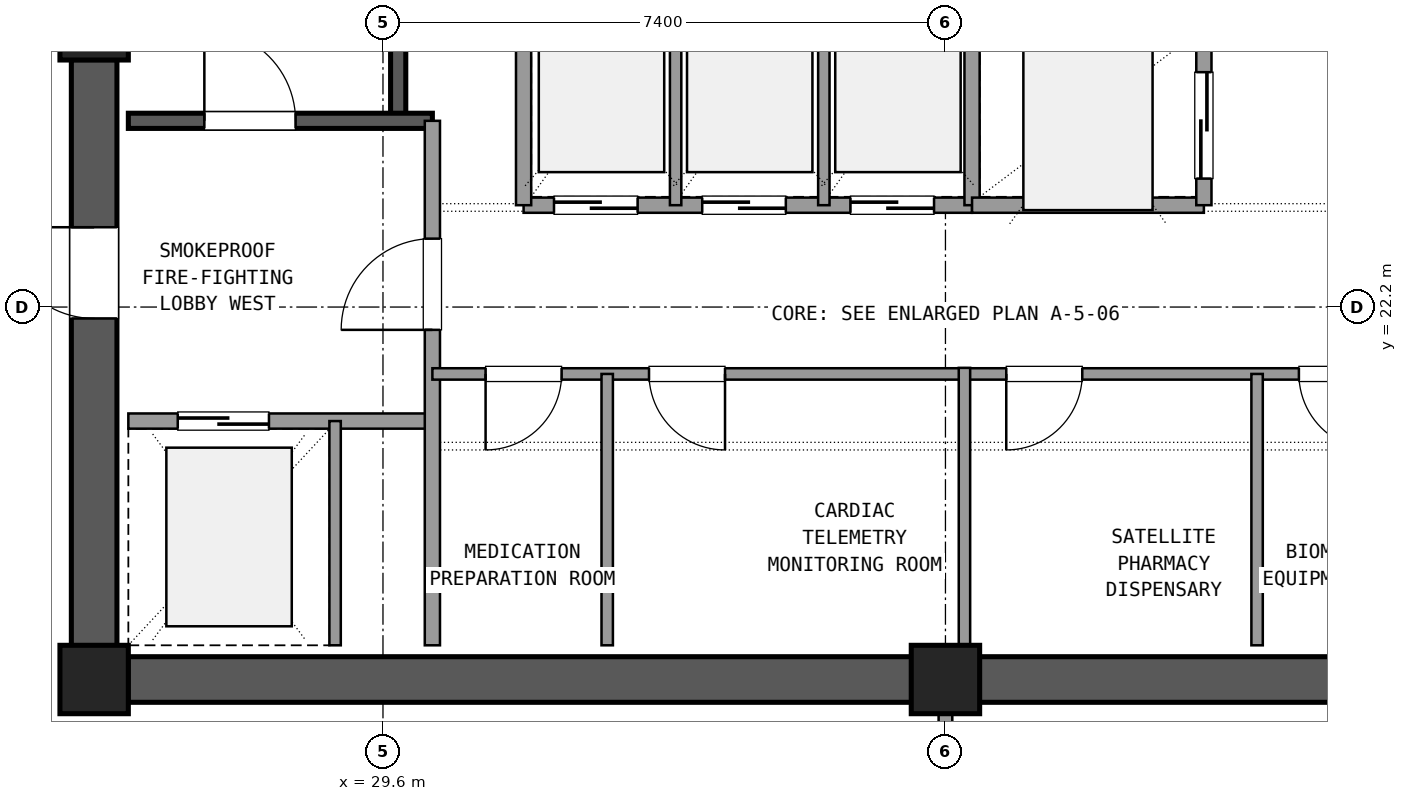
"""IFC4 building model, lengths in metres.
Left out: names, types, materials, properties, quantities, classifications, styles, units other than length and angle.
Written with IfcOpenShell. Run it as: python <this file> out.ifc"""

import sys

from ifc_helpers import new_model, si_unit, direction, frame, frame_2d, origin, origin_2d, place, context, subcontext, project, spatial, rectangle, extrude, element, fill, save


model = new_model("IFC4")
c1 = context("Model", 3, precision=1e-05, world=origin(), true_north=direction((0.0, 1.0)))
c2 = subcontext(c1, "Body", "Model", "MODEL_VIEW")
j1 = project(units=[si_unit("LENGTHUNIT", "METRE"), si_unit("PLANEANGLEUNIT", "RADIAN")], contexts=[c1])
p1 = place(None, origin())
s1 = spatial("IfcSite", under=j1, at=p1, CompositionType="ELEMENT")
p2 = place(p1, origin())
s2 = spatial("IfcBuilding", under=s1, at=p2, CompositionType="ELEMENT")
p3 = place(p2, frame((0.0, 0.0, 250.02)))
s3 = spatial("IfcBuildingStorey", under=s2, at=p3, CompositionType="ELEMENT", Elevation=250.02)
for number, where, z_axis, x_axis in (
    (1, (25.8, 17.3, 0.0), (0.0, 0.0, 1.0), (1.0, 0.0, 0.0)),
    (2, (37.0, 17.3, 0.0), (0.0, 0.0, 1.0), (1.0, 0.0, 0.0)),
    (3, (25.8, 25.9, 0.0), (0.0, 0.0, 1.0), (1.0, 0.0, 0.0)),
):
    element("IfcColumn", number, at=place(p3, frame(where, z_axis=z_axis, x_axis=x_axis)), inside=s3, PredefinedType="COLUMN", context=c2, shape_type="SweptSolid", body=[
        extrude(rectangle(XDim=0.9, YDim=0.9, at=origin_2d()), origin(), (0.0, 0.0, 1.0), 3.6),
    ])
for number, where, z_axis, x_axis in (
    (4, (26.245, 17.3, 0.0), (0.0, 0.0, 1.0), (1.0, 0.0, 0.0)),
    (5, (37.445, 17.3, 0.0), (0.0, 0.0, 1.0), (1.0, 0.0, 0.0)),
):
    element("IfcWall", number, at=place(p3, frame(where, z_axis=z_axis, x_axis=x_axis)), inside=s3, PredefinedType="SHEAR", context=c2, shape_type="SweptSolid", body=[
        extrude(rectangle(XDim=10.31, YDim=0.6, at=frame_2d((5.155, 0.0))), origin(), (0.0, 0.0, 1.0), 3.32),
    ])
p4 = place(p3, frame((25.8, 25.455, 0.0), z_axis=(0.0, 0.0, 1.0), x_axis=(0.0, -1.0, 0.0)))
e6 = element("IfcWall", 6, at=p4, inside=s3, PredefinedType="SHEAR", context=c2, shape_type="SweptSolid", body=[
    extrude(rectangle(XDim=7.71, YDim=0.6, at=frame_2d((3.855, 0.0))), origin(), (0.0, 0.0, 1.0), 3.32),
])
p5 = place(p4, frame((2.205, 0.0, 0.0)))
e7 = element("IfcOpeningElement", 7, at=p5, cuts=e6, PredefinedType="OPENING", context=c2, shape_type="SweptSolid", body=[
    extrude(rectangle(XDim=1.2, YDim=2.15, at=frame_2d((0.6, 1.075))), frame((0.0, 0.31, 0.0), z_axis=(0.0, -1.0, 0.0), x_axis=(1.0, 0.0, 0.0)), (0.0, 0.0, 1.0), 0.62),
])
p6 = place(p3, frame((29.8, 24.65, 0.0), z_axis=(0.0, 0.0, 1.0), x_axis=(0.0, 1.0, 0.0)))
e8 = element("IfcWall", 8, at=p6, inside=s3, PredefinedType="SHEAR", context=c2, shape_type="SweptSolid", body=[
    extrude(rectangle(XDim=9.4, YDim=0.2, at=frame_2d((4.7, 0.0))), origin(), (0.0, 0.0, 1.0), 3.32),
])
p7 = place(p3, frame((26.25, 24.65, 0.0), z_axis=(0.0, 0.0, 1.0), x_axis=(1.0, 0.0, 0.0)))
e9 = element("IfcWall", 9, at=p7, inside=s3, PredefinedType="SHEAR", context=c2, shape_type="SweptSolid", body=[
    extrude(rectangle(XDim=4.0, YDim=0.2, at=frame_2d((2.0, 0.0))), origin(), (0.0, 0.0, 1.0), 3.32),
])
p8 = place(p7, frame((1.0, 0.0, 0.0)))
e10 = element("IfcOpeningElement", 10, at=p8, cuts=e9, PredefinedType="OPENING", context=c2, shape_type="SweptSolid", body=[
    extrude(rectangle(XDim=1.2, YDim=2.15, at=frame_2d((0.6, 1.075))), frame((0.0, 0.11, 0.0), z_axis=(0.0, -1.0, 0.0), x_axis=(1.0, 0.0, 0.0)), (0.0, 0.0, 1.0), 0.22),
])
p9 = place(p3, frame((26.25, 20.7, 0.0), z_axis=(0.0, 0.0, 1.0), x_axis=(1.0, 0.0, 0.0)))
e11 = element("IfcWall", 11, at=p9, inside=s3, PredefinedType="SOLIDWALL", context=c2, shape_type="SweptSolid", body=[
    extrude(rectangle(XDim=4.0, YDim=0.2, at=frame_2d((2.0, 0.0))), origin(), (0.0, 0.0, 1.0), 2.61),
])
p10 = place(p9, frame((0.65, 0.0, 0.0)))
e12 = element("IfcOpeningElement", 12, at=p10, cuts=e11, PredefinedType="OPENING", context=c2, shape_type="SweptSolid", body=[
    extrude(rectangle(XDim=1.2, YDim=2.15, at=frame_2d((0.6, 1.075))), frame((0.0, 0.11, 0.0), z_axis=(0.0, -1.0, 0.0), x_axis=(1.0, 0.0, 0.0)), (0.0, 0.0, 1.0), 0.22),
])
p11 = place(p3, frame((30.25, 17.75, 0.0), z_axis=(0.0, 0.0, 1.0), x_axis=(0.0, 1.0, 0.0)))
e13 = element("IfcWall", 13, at=p11, inside=s3, PredefinedType="SOLIDWALL", context=c2, shape_type="SweptSolid", body=[
    extrude(rectangle(XDim=6.9, YDim=0.2, at=frame_2d((3.45, 0.0))), origin(), (0.0, 0.0, 1.0), 2.61),
])
p12 = place(p11, frame((4.15, 0.0, 0.0)))
e14 = element("IfcOpeningElement", 14, at=p12, cuts=e13, PredefinedType="OPENING", context=c2, shape_type="SweptSolid", body=[
    extrude(rectangle(XDim=1.2, YDim=2.15, at=frame_2d((0.6, 1.075))), frame((0.0, 0.11, 0.0), z_axis=(0.0, -1.0, 0.0), x_axis=(1.0, 0.0, 0.0)), (0.0, 0.0, 1.0), 0.22),
])
p13 = place(p3, frame((28.97, 17.75, 0.0), z_axis=(0.0, 0.0, 1.0), x_axis=(0.0, 1.0, 0.0)))
e15 = element("IfcWall", 15, at=p13, inside=s3, PredefinedType="PARTITIONING", context=c2, shape_type="SweptSolid", body=[
    extrude(rectangle(XDim=2.95, YDim=0.15, at=frame_2d((1.475, 0.0))), origin(), (0.0, 0.0, 1.0), 2.61),
])
p14 = place(p3, frame((30.25, 21.32, 0.0), z_axis=(0.0, 0.0, 1.0), x_axis=(1.0, 0.0, 0.0)))
e16 = element("IfcWall", 16, at=p14, inside=s3, PredefinedType="PARTITIONING", context=c2, shape_type="SweptSolid", body=[
    extrude(rectangle(XDim=7.0, YDim=0.15, at=frame_2d((3.5, 0.0))), origin(), (0.0, 0.0, 1.0), 2.61),
])
p15 = place(p14, frame((0.7, 0.0, 0.0)))
e17 = element("IfcOpeningElement", 17, at=p15, cuts=e16, PredefinedType="OPENING", context=c2, shape_type="SweptSolid", body=[
    extrude(rectangle(XDim=1.0, YDim=2.15, at=frame_2d((0.5, 1.075))), frame((0.0, 0.085, 0.0), z_axis=(0.0, -1.0, 0.0), x_axis=(1.0, 0.0, 0.0)), (0.0, 0.0, 1.0), 0.17),
])
p16 = place(p14, frame((2.85, 0.0, 0.0)))
e18 = element("IfcOpeningElement", 18, at=p16, cuts=e16, PredefinedType="OPENING", context=c2, shape_type="SweptSolid", body=[
    extrude(rectangle(XDim=1.0, YDim=2.15, at=frame_2d((0.5, 1.075))), frame((0.0, 0.085, 0.0), z_axis=(0.0, -1.0, 0.0), x_axis=(1.0, 0.0, 0.0)), (0.0, 0.0, 1.0), 0.17),
])
p17 = place(p3, frame((32.55, 17.75, 0.0), z_axis=(0.0, 0.0, 1.0), x_axis=(0.0, 1.0, 0.0)))
e19 = element("IfcWall", 19, at=p17, inside=s3, PredefinedType="PARTITIONING", context=c2, shape_type="SweptSolid", body=[
    extrude(rectangle(XDim=3.57, YDim=0.15, at=frame_2d((1.785, 0.0))), origin(), (0.0, 0.0, 1.0), 2.61),
])
p18 = place(p3, frame((37.25, 21.32, 0.0), z_axis=(0.0, 0.0, 1.0), x_axis=(1.0, 0.0, 0.0)))
e20 = element("IfcWall", 20, at=p18, inside=s3, PredefinedType="PARTITIONING", context=c2, shape_type="SweptSolid", body=[
    extrude(rectangle(XDim=6.1, YDim=0.15, at=frame_2d((3.05, 0.0))), origin(), (0.0, 0.0, 1.0), 2.61),
])
p19 = place(p18, frame((0.55, 0.0, 0.0)))
e21 = element("IfcOpeningElement", 21, at=p19, cuts=e20, PredefinedType="OPENING", context=c2, shape_type="SweptSolid", body=[
    extrude(rectangle(XDim=1.0, YDim=2.15, at=frame_2d((0.5, 1.075))), frame((0.0, 0.085, 0.0), z_axis=(0.0, -1.0, 0.0), x_axis=(1.0, 0.0, 0.0)), (0.0, 0.0, 1.0), 0.17),
])
p20 = place(p18, frame((4.4, 0.0, 0.0)))
e22 = element("IfcOpeningElement", 22, at=p20, cuts=e20, PredefinedType="OPENING", context=c2, shape_type="SweptSolid", body=[
    extrude(rectangle(XDim=1.0, YDim=2.15, at=frame_2d((0.5, 1.075))), frame((0.0, 0.085, 0.0), z_axis=(0.0, -1.0, 0.0), x_axis=(1.0, 0.0, 0.0)), (0.0, 0.0, 1.0), 0.17),
])
p21 = place(p3, frame((41.1, 17.75, 0.0), z_axis=(0.0, 0.0, 1.0), x_axis=(0.0, 1.0, 0.0)))
e23 = element("IfcWall", 23, at=p21, inside=s3, PredefinedType="PARTITIONING", context=c2, shape_type="SweptSolid", body=[
    extrude(rectangle(XDim=3.57, YDim=0.15, at=frame_2d((1.785, 0.0))), origin(), (0.0, 0.0, 1.0), 2.61),
])
p22 = place(p3, frame((37.25, 17.75, 0.0), z_axis=(0.0, 0.0, 1.0), x_axis=(0.0, 1.0, 0.0)))
e24 = element("IfcWall", 24, at=p22, inside=s3, PredefinedType="PARTITIONING", context=c2, shape_type="SweptSolid", body=[
    extrude(rectangle(XDim=3.65, YDim=0.15, at=frame_2d((1.825, 0.0))), origin(), (0.0, 0.0, 1.0), 2.61),
])
p23 = place(p3, frame((31.45, 23.54, 0.0), z_axis=(0.0, 0.0, 1.0), x_axis=(1.0, 0.0, 0.0)))
e25 = element("IfcWall", 25, at=p23, inside=s3, PredefinedType="SOLIDWALL", context=c2, shape_type="SweptSolid", body=[
    extrude(rectangle(XDim=5.9, YDim=0.2, at=frame_2d((2.95, 0.0))), origin(), (0.0, 0.0, 1.0), 2.61),
])
p24 = place(p23, frame((0.4, 0.0, 0.0)))
e26 = element("IfcOpeningElement", 26, at=p24, cuts=e25, PredefinedType="OPENING", context=c2, shape_type="SweptSolid", body=[
    extrude(rectangle(XDim=1.1, YDim=2.15, at=frame_2d((0.55, 1.075))), frame((0.0, 0.11, 0.0), z_axis=(0.0, -1.0, 0.0), x_axis=(1.0, 0.0, 0.0)), (0.0, 0.0, 1.0), 0.22),
])
p25 = place(p23, frame((2.35, 0.0, 0.0)))
e27 = element("IfcOpeningElement", 27, at=p25, cuts=e25, PredefinedType="OPENING", context=c2, shape_type="SweptSolid", body=[
    extrude(rectangle(XDim=1.1, YDim=2.15, at=frame_2d((0.55, 1.075))), frame((0.0, 0.11, 0.0), z_axis=(0.0, -1.0, 0.0), x_axis=(1.0, 0.0, 0.0)), (0.0, 0.0, 1.0), 0.22),
])
p26 = place(p23, frame((4.3, 0.0, 0.0)))
e28 = element("IfcOpeningElement", 28, at=p26, cuts=e25, PredefinedType="OPENING", context=c2, shape_type="SweptSolid", body=[
    extrude(rectangle(XDim=1.1, YDim=2.15, at=frame_2d((0.55, 1.075))), frame((0.0, 0.11, 0.0), z_axis=(0.0, -1.0, 0.0), x_axis=(1.0, 0.0, 0.0)), (0.0, 0.0, 1.0), 0.22),
])
p27 = place(p3, frame((31.45, 23.54, 0.0), z_axis=(0.0, 0.0, 1.0), x_axis=(0.0, 1.0, 0.0)))
e29 = element("IfcWall", 29, at=p27, inside=s3, PredefinedType="SOLIDWALL", context=c2, shape_type="SweptSolid", body=[
    extrude(rectangle(XDim=2.81, YDim=0.2, at=frame_2d((1.405, 0.0))), origin(), (0.0, 0.0, 1.0), 2.61),
])
for number, where, z_axis, x_axis in (
    (30, (33.45, 23.54, 0.0), (0.0, 0.0, 1.0), (0.0, 1.0, 0.0)),
    (31, (35.4, 23.54, 0.0), (0.0, 0.0, 1.0), (0.0, 1.0, 0.0)),
):
    element("IfcWall", number, at=place(p3, frame(where, z_axis=z_axis, x_axis=x_axis)), inside=s3, PredefinedType="PARTITIONING", context=c2, shape_type="SweptSolid", body=[
        extrude(rectangle(XDim=2.81, YDim=0.15, at=frame_2d((1.405, 0.0))), origin(), (0.0, 0.0, 1.0), 2.61),
    ])
p28 = place(p3, frame((37.35, 23.54, 0.0), z_axis=(0.0, 0.0, 1.0), x_axis=(0.0, 1.0, 0.0)))
e32 = element("IfcWall", 32, at=p28, inside=s3, PredefinedType="SOLIDWALL", context=c2, shape_type="SweptSolid", body=[
    extrude(rectangle(XDim=6.82, YDim=0.2, at=frame_2d((3.41, 0.0))), origin(), (0.0, 0.0, 1.0), 2.61),
])
p29 = place(p3, frame((37.35, 23.54, 0.0), z_axis=(0.0, 0.0, 1.0), x_axis=(1.0, 0.0, 0.0)))
e33 = element("IfcWall", 33, at=p29, inside=s3, PredefinedType="SOLIDWALL", context=c2, shape_type="SweptSolid", body=[
    extrude(rectangle(XDim=3.05, YDim=0.2, at=frame_2d((1.525, 0.0))), origin(), (0.0, 0.0, 1.0), 2.61),
])
p30 = place(p3, frame((40.4, 23.54, 0.0), z_axis=(0.0, 0.0, 1.0), x_axis=(0.0, 1.0, 0.0)))
e34 = element("IfcWall", 34, at=p30, inside=s3, PredefinedType="SOLIDWALL", context=c2, shape_type="SweptSolid", body=[
    extrude(rectangle(XDim=6.82, YDim=0.2, at=frame_2d((3.41, 0.0))), origin(), (0.0, 0.0, 1.0), 2.61),
])
p31 = place(p30, frame((0.35, 0.0, 0.0)))
e35 = element("IfcOpeningElement", 35, at=p31, cuts=e34, PredefinedType="OPENING", context=c2, shape_type="SweptSolid", body=[
    extrude(rectangle(XDim=1.4, YDim=2.2, at=frame_2d((0.7, 1.1))), frame((0.0, 0.11, 0.0), z_axis=(0.0, -1.0, 0.0), x_axis=(1.0, 0.0, 0.0)), (0.0, 0.0, 1.0), 0.22),
])
p32 = place(p30, frame((2.65, 0.0, 0.0)))
e36 = element("IfcOpeningElement", 36, at=p32, cuts=e34, PredefinedType="OPENING", context=c2, shape_type="SweptSolid", body=[
    extrude(rectangle(XDim=1.4, YDim=2.2, at=frame_2d((0.7, 1.1))), frame((0.0, 0.11, 0.0), z_axis=(0.0, -1.0, 0.0), x_axis=(1.0, 0.0, 0.0)), (0.0, 0.0, 1.0), 0.22),
])
p33 = place(p30, frame((4.85, 0.0, 0.0)))
e37 = element("IfcOpeningElement", 37, at=p33, cuts=e34, PredefinedType="OPENING", context=c2, shape_type="SweptSolid", body=[
    extrude(rectangle(XDim=1.4, YDim=2.2, at=frame_2d((0.7, 1.1))), frame((0.0, 0.11, 0.0), z_axis=(0.0, -1.0, 0.0), x_axis=(1.0, 0.0, 0.0)), (0.0, 0.0, 1.0), 0.22),
])
p34 = place(p3, frame((37.0, 14.15, 0.0), z_axis=(0.0, 0.0, 1.0), x_axis=(0.0, 1.0, 0.0)))
e38 = element("IfcWall", 38, at=p34, inside=s3, PredefinedType="PARTITIONING", context=c2, shape_type="SweptSolid", body=[
    extrude(rectangle(XDim=2.7, YDim=0.18, at=frame_2d((1.35, 0.0))), origin(), (0.0, 0.0, 1.0), 2.61),
])
p35 = place(p34, frame((0.35, 0.0, 0.0)))
e39 = element("IfcOpeningElement", 39, at=p35, cuts=e38, PredefinedType="OPENING", context=c2, shape_type="SweptSolid", body=[
    extrude(rectangle(XDim=2.0, YDim=2.2, at=frame_2d((1.0, 1.1))), frame((0.0, 0.1, 0.0), z_axis=(0.0, -1.0, 0.0), x_axis=(1.0, 0.0, 0.0)), (0.0, 0.0, 1.0), 0.2),
])
p36 = place(p8, origin())
e40 = element("IfcDoor", 40, at=p36, inside=s3, OperationType="SINGLE_SWING_LEFT", PredefinedType="DOOR", context=c2, shape_type="SweptSolid", body=[
    extrude(rectangle(XDim=1.2, YDim=2.15, at=frame_2d((0.6, 1.075))), frame((0.0, 0.025, 0.0), z_axis=(0.0, -1.0, 0.0), x_axis=(1.0, 0.0, 0.0)), (0.0, 0.0, 1.0), 0.05),
])
fill(e10, e40)
p37 = place(p10, origin())
e41 = element("IfcDoor", 41, at=p37, inside=s3, OperationType="SLIDING_TO_LEFT", PredefinedType="DOOR", context=c2, shape_type="SweptSolid", body=[
    extrude(rectangle(XDim=1.2, YDim=2.15, at=frame_2d((0.6, 1.075))), frame((0.0, 0.025, 0.0), z_axis=(0.0, -1.0, 0.0), x_axis=(1.0, 0.0, 0.0)), (0.0, 0.0, 1.0), 0.05),
])
fill(e12, e41)
p38 = place(p12, origin())
e42 = element("IfcDoor", 42, at=p38, inside=s3, OperationType="SINGLE_SWING_LEFT", PredefinedType="DOOR", context=c2, shape_type="SweptSolid", body=[
    extrude(rectangle(XDim=1.2, YDim=2.15, at=frame_2d((0.6, 1.075))), frame((0.0, 0.025, 0.0), z_axis=(0.0, -1.0, 0.0), x_axis=(1.0, 0.0, 0.0)), (0.0, 0.0, 1.0), 0.05),
])
fill(e14, e42)
p39 = place(p5, frame((1.2, 0.0, 0.0), z_axis=(0.0, 0.0, 1.0), x_axis=(-1.0, 0.0, 0.0)))
e43 = element("IfcDoor", 43, at=p39, inside=s3, OperationType="SINGLE_SWING_LEFT", PredefinedType="DOOR", context=c2, shape_type="SweptSolid", body=[
    extrude(rectangle(XDim=1.2, YDim=2.15, at=frame_2d((0.6, 1.075))), frame((0.0, 0.025, 0.0), z_axis=(0.0, -1.0, 0.0), x_axis=(1.0, 0.0, 0.0)), (0.0, 0.0, 1.0), 0.05),
])
fill(e7, e43)
p40 = place(p15, frame((1.0, 0.0, 0.0), z_axis=(0.0, 0.0, 1.0), x_axis=(-1.0, 0.0, 0.0)))
e44 = element("IfcDoor", 44, at=p40, inside=s3, OperationType="SINGLE_SWING_LEFT", PredefinedType="DOOR", context=c2, shape_type="SweptSolid", body=[
    extrude(rectangle(XDim=1.0, YDim=2.15, at=frame_2d((0.5, 1.075))), frame((0.0, 0.025, 0.0), z_axis=(0.0, -1.0, 0.0), x_axis=(1.0, 0.0, 0.0)), (0.0, 0.0, 1.0), 0.05),
])
fill(e17, e44)
p41 = place(p16, frame((1.0, 0.0, 0.0), z_axis=(0.0, 0.0, 1.0), x_axis=(-1.0, 0.0, 0.0)))
e45 = element("IfcDoor", 45, at=p41, inside=s3, OperationType="SINGLE_SWING_RIGHT", PredefinedType="DOOR", context=c2, shape_type="SweptSolid", body=[
    extrude(rectangle(XDim=1.0, YDim=2.15, at=frame_2d((0.5, 1.075))), frame((0.0, 0.025, 0.0), z_axis=(0.0, -1.0, 0.0), x_axis=(1.0, 0.0, 0.0)), (0.0, 0.0, 1.0), 0.05),
])
fill(e18, e45)
p42 = place(p19, frame((1.0, 0.0, 0.0), z_axis=(0.0, 0.0, 1.0), x_axis=(-1.0, 0.0, 0.0)))
e46 = element("IfcDoor", 46, at=p42, inside=s3, OperationType="SINGLE_SWING_LEFT", PredefinedType="DOOR", context=c2, shape_type="SweptSolid", body=[
    extrude(rectangle(XDim=1.0, YDim=2.15, at=frame_2d((0.5, 1.075))), frame((0.0, 0.025, 0.0), z_axis=(0.0, -1.0, 0.0), x_axis=(1.0, 0.0, 0.0)), (0.0, 0.0, 1.0), 0.05),
])
fill(e21, e46)
p43 = place(p20, frame((1.0, 0.0, 0.0), z_axis=(0.0, 0.0, 1.0), x_axis=(-1.0, 0.0, 0.0)))
e47 = element("IfcDoor", 47, at=p43, inside=s3, OperationType="SINGLE_SWING_RIGHT", PredefinedType="DOOR", context=c2, shape_type="SweptSolid", body=[
    extrude(rectangle(XDim=1.0, YDim=2.15, at=frame_2d((0.5, 1.075))), frame((0.0, 0.025, 0.0), z_axis=(0.0, -1.0, 0.0), x_axis=(1.0, 0.0, 0.0)), (0.0, 0.0, 1.0), 0.05),
])
fill(e22, e47)
p44 = place(p24, origin())
e48 = element("IfcDoor", 48, at=p44, inside=s3, OperationType="SLIDING_TO_RIGHT", PredefinedType="DOOR", context=c2, shape_type="SweptSolid", body=[
    extrude(rectangle(XDim=1.1, YDim=2.15, at=frame_2d((0.55, 1.075))), frame((0.0, 0.025, 0.0), z_axis=(0.0, -1.0, 0.0), x_axis=(1.0, 0.0, 0.0)), (0.0, 0.0, 1.0), 0.05),
])
fill(e26, e48)
p45 = place(p25, origin())
e49 = element("IfcDoor", 49, at=p45, inside=s3, OperationType="SLIDING_TO_RIGHT", PredefinedType="DOOR", context=c2, shape_type="SweptSolid", body=[
    extrude(rectangle(XDim=1.1, YDim=2.15, at=frame_2d((0.55, 1.075))), frame((0.0, 0.025, 0.0), z_axis=(0.0, -1.0, 0.0), x_axis=(1.0, 0.0, 0.0)), (0.0, 0.0, 1.0), 0.05),
])
fill(e27, e49)
p46 = place(p26, origin())
e50 = element("IfcDoor", 50, at=p46, inside=s3, OperationType="SLIDING_TO_RIGHT", PredefinedType="DOOR", context=c2, shape_type="SweptSolid", body=[
    extrude(rectangle(XDim=1.1, YDim=2.15, at=frame_2d((0.55, 1.075))), frame((0.0, 0.025, 0.0), z_axis=(0.0, -1.0, 0.0), x_axis=(1.0, 0.0, 0.0)), (0.0, 0.0, 1.0), 0.05),
])
fill(e28, e50)
p47 = place(p31, origin())
e51 = element("IfcDoor", 51, at=p47, inside=s3, OperationType="SLIDING_TO_LEFT", PredefinedType="DOOR", context=c2, shape_type="SweptSolid", body=[
    extrude(rectangle(XDim=1.4, YDim=2.2, at=frame_2d((0.7, 1.1))), frame((0.0, 0.025, 0.0), z_axis=(0.0, -1.0, 0.0), x_axis=(1.0, 0.0, 0.0)), (0.0, 0.0, 1.0), 0.05),
])
fill(e35, e51)
save(model, sys.argv[1])
